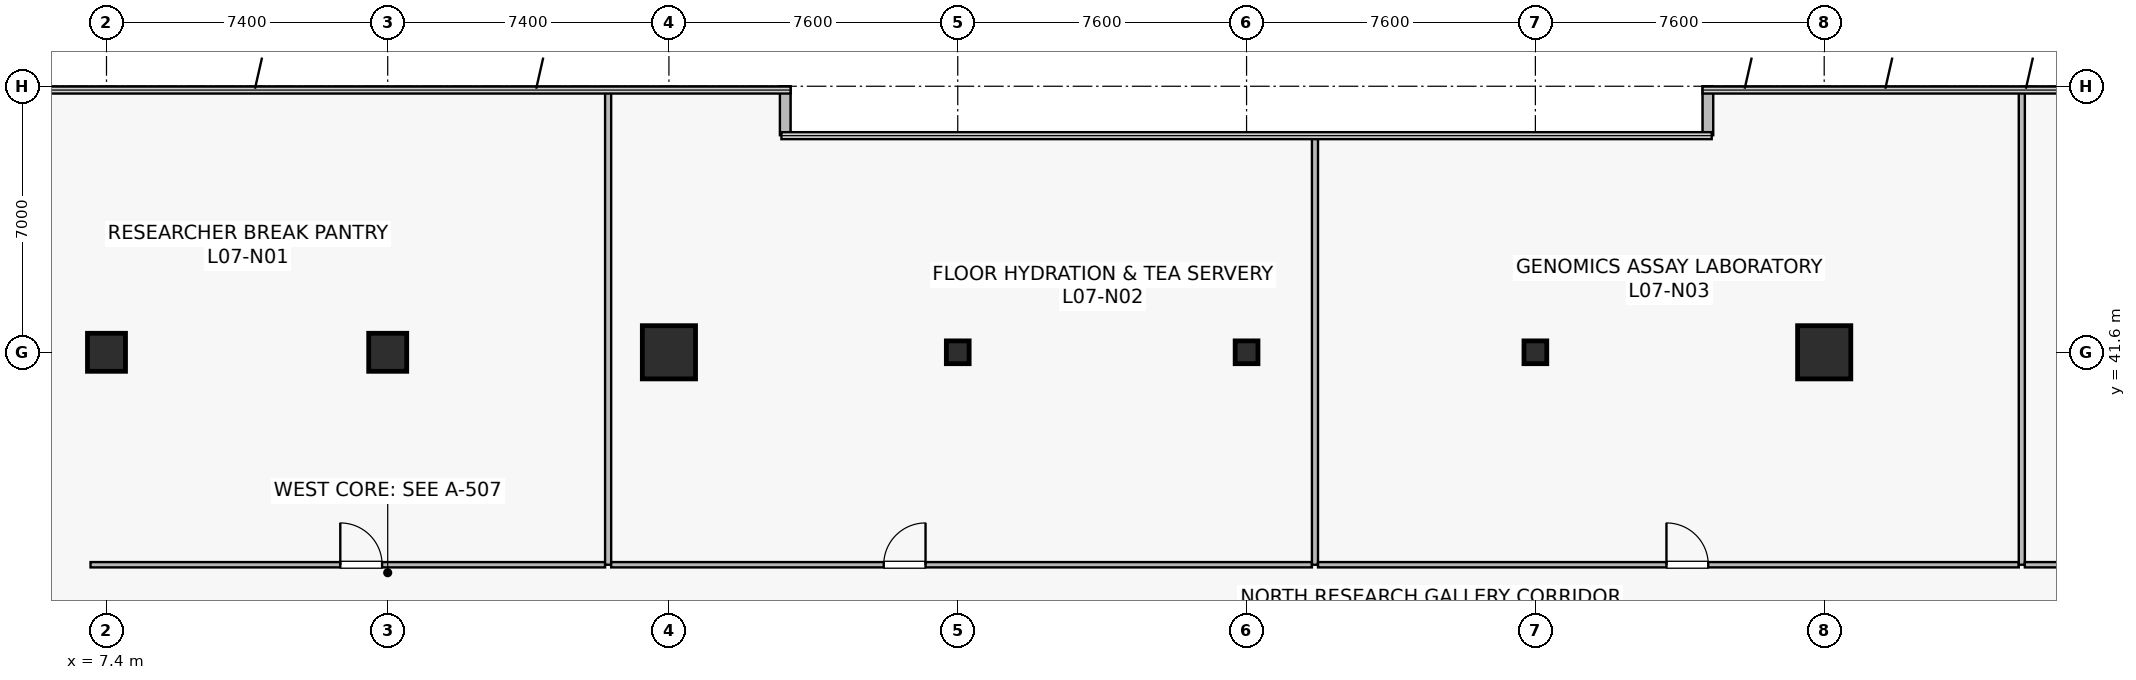
"""IFC4 building model, lengths in metres.
Left out: names, types, materials, properties, quantities, classifications, styles, units other than length and angle.
Written with IfcOpenShell. Run it as: python <this file> out.ifc"""

import sys

from ifc_helpers import new_model, si_unit, direction, frame, frame_2d, origin, origin_2d, place, context, subcontext, project, spatial, rectangle, hollow_rectangle, extrude, source, transform, mapped, element, fill, save


model = new_model("IFC4")
c1 = context("Model", 3, precision=1e-05, world=origin(), true_north=direction((0.0, 1.0)))
c2 = subcontext(c1, "Body", "Model", "MODEL_VIEW")
j1 = project(units=[si_unit("LENGTHUNIT", "METRE"), si_unit("PLANEANGLEUNIT", "RADIAN")], contexts=[c1])
p1 = place(None, origin())
s1 = spatial("IfcSite", under=j1, at=p1, CompositionType="ELEMENT")
p2 = place(p1, origin())
s2 = spatial("IfcBuilding", under=s1, at=p2, CompositionType="ELEMENT")
p3 = place(p2, frame((0.0, 0.0, 29.3)))
s3 = spatial("IfcBuildingStorey", under=s2, at=p3, CompositionType="ELEMENT", Elevation=29.3)
m1 = source(origin(), c2, "Body", "SweptSolid", [
    extrude(rectangle(XDim=1.0, YDim=1.0, at=origin_2d()), origin(), (0.0, 0.0, 1.0), 4.1),
])
p4 = place(p3, frame((14.8, 41.6, 0.0), z_axis=(0.0, 0.0, 1.0), x_axis=(1.0, 0.0, 0.0)))
e1 = element("IfcColumn", 1, at=p4, inside=s3, PredefinedType="COLUMN", context=c2, shape_type="MappedRepresentation", body=[
    mapped(m1, transform((0.0, 0.0, 0.0), scale=1.0)),
])
m2 = source(origin(), c2, "Body", "SweptSolid", [
    extrude(rectangle(XDim=1.4, YDim=1.4, at=origin_2d()), origin(), (0.0, 0.0, 1.0), 4.1),
])
for number, where, z_axis, x_axis in (
    (2, (22.2, 41.6, 0.0), (0.0, 0.0, 1.0), (1.0, 0.0, 0.0)),
    (3, (52.6, 41.6, 0.0), (0.0, 0.0, 1.0), (1.0, 0.0, 0.0)),
):
    element("IfcColumn", number, at=place(p3, frame(where, z_axis=z_axis, x_axis=x_axis)), inside=s3, PredefinedType="COLUMN", context=c2, shape_type="MappedRepresentation", body=[
        mapped(m2, transform((0.0, 0.0, 0.0), scale=1.0)),
    ])
p5 = place(p3, frame((7.4, 41.6, 0.0), z_axis=(0.0, 0.0, 1.0), x_axis=(1.0, 0.0, 0.0)))
e4 = element("IfcColumn", 4, at=p5, inside=s3, PredefinedType="COLUMN", context=c2, shape_type="MappedRepresentation", body=[
    mapped(m1, transform((0.0, 0.0, 0.0), scale=1.0)),
])
m3 = source(origin(), c2, "Body", "SweptSolid", [
    extrude(hollow_rectangle(XDim=0.6, YDim=0.6, WallThickness=0.028, at=origin_2d()), origin(), (0.0, 0.0, 1.0), 4.1),
])
for number, where, z_axis, x_axis in (
    (5, (29.8, 41.6, 0.0), (0.0, 0.0, 1.0), (1.0, 0.0, 0.0)),
    (6, (37.4, 41.6, 0.0), (0.0, 0.0, 1.0), (1.0, 0.0, 0.0)),
    (7, (45.0, 41.6, 0.0), (0.0, 0.0, 1.0), (1.0, 0.0, 0.0)),
):
    element("IfcColumn", number, at=place(p3, frame(where, z_axis=z_axis, x_axis=x_axis)), inside=s3, PredefinedType="COLUMN", context=c2, shape_type="MappedRepresentation", body=[
        mapped(m3, transform((0.0, 0.0, 0.0), scale=1.0)),
    ])
for number, where, z_axis, x_axis in (
    (8, (49.54, 48.6, 0.0), (0.0, 0.0, 1.0), (0.0, -1.0, 0.0)),
    (9, (25.26, 47.312, 0.0), (0.0, 0.0, 1.0), (0.0, 1.0, 0.0)),
):
    element("IfcWall", number, at=place(p3, frame(where, z_axis=z_axis, x_axis=x_axis)), inside=s3, PredefinedType="STANDARD", context=c2, shape_type="SweptSolid", body=[
        extrude(rectangle(XDim=1.288, YDim=0.28, at=frame_2d((0.644, 0.0))), origin(), (0.0, 0.0, 1.0), 3.78),
    ])
p6 = place(p3, frame((6.98, 36.01, 0.0), z_axis=(0.0, 0.0, 1.0), x_axis=(1.0, 0.0, 0.0)))
e10 = element("IfcWall", 10, at=p6, inside=s3, PredefinedType="PARTITIONING", context=c2, shape_type="SweptSolid", body=[
    extrude(rectangle(XDim=13.54, YDim=0.14, at=frame_2d((6.77, 0.0))), origin(), (0.0, 0.0, 1.0), 3.065),
])
p7 = place(p6, frame((6.572, 0.0, 0.0)))
e11 = element("IfcOpeningElement", 11, at=p7, cuts=e10, PredefinedType="OPENING", context=c2, shape_type="SweptSolid", body=[
    extrude(rectangle(XDim=1.1, YDim=2.18, at=frame_2d((0.55, 1.09))), frame((0.0, 0.08, 0.0), z_axis=(0.0, -1.0, 0.0), x_axis=(1.0, 0.0, 0.0)), (0.0, 0.0, 1.0), 0.16),
])
p8 = place(p3, frame((20.6, 36.01, 0.0), z_axis=(0.0, 0.0, 1.0), x_axis=(0.0, 1.0, 0.0)))
e12 = element("IfcWall", 12, at=p8, inside=s3, PredefinedType="PARTITIONING", context=c2, shape_type="SweptSolid", body=[
    extrude(rectangle(XDim=12.48, YDim=0.16, at=frame_2d((6.24, 0.0))), origin(), (0.0, 0.0, 1.0), 3.015),
])
p9 = place(p3, frame((20.68, 36.01, 0.0), z_axis=(0.0, 0.0, 1.0), x_axis=(1.0, 0.0, 0.0)))
e13 = element("IfcWall", 13, at=p9, inside=s3, PredefinedType="PARTITIONING", context=c2, shape_type="SweptSolid", body=[
    extrude(rectangle(XDim=18.44, YDim=0.14, at=frame_2d((9.22, 0.0))), origin(), (0.0, 0.0, 1.0), 3.065),
])
p10 = place(p9, frame((7.172, 0.0, 0.0)))
e14 = element("IfcOpeningElement", 14, at=p10, cuts=e13, PredefinedType="OPENING", context=c2, shape_type="SweptSolid", body=[
    extrude(rectangle(XDim=1.1, YDim=2.18, at=frame_2d((0.55, 1.09))), frame((0.0, 0.08, 0.0), z_axis=(0.0, -1.0, 0.0), x_axis=(1.0, 0.0, 0.0)), (0.0, 0.0, 1.0), 0.16),
])
p11 = place(p3, frame((39.2, 36.01, 0.0), z_axis=(0.0, 0.0, 1.0), x_axis=(0.0, 1.0, 0.0)))
e15 = element("IfcWall", 15, at=p11, inside=s3, PredefinedType="PARTITIONING", context=c2, shape_type="SweptSolid", body=[
    extrude(rectangle(XDim=11.28, YDim=0.16, at=frame_2d((5.64, 0.0))), origin(), (0.0, 0.0, 1.0), 3.015),
])
p12 = place(p3, frame((39.28, 36.01, 0.0), z_axis=(0.0, 0.0, 1.0), x_axis=(1.0, 0.0, 0.0)))
e16 = element("IfcWall", 16, at=p12, inside=s3, PredefinedType="PARTITIONING", context=c2, shape_type="SweptSolid", body=[
    extrude(rectangle(XDim=18.44, YDim=0.14, at=frame_2d((9.22, 0.0))), origin(), (0.0, 0.0, 1.0), 3.065),
])
p13 = place(p12, frame((9.169, 0.0, 0.0)))
e17 = element("IfcOpeningElement", 17, at=p13, cuts=e16, PredefinedType="OPENING", context=c2, shape_type="SweptSolid", body=[
    extrude(rectangle(XDim=1.1, YDim=2.18, at=frame_2d((0.55, 1.09))), frame((0.0, 0.08, 0.0), z_axis=(0.0, -1.0, 0.0), x_axis=(1.0, 0.0, 0.0)), (0.0, 0.0, 1.0), 0.16),
])
p14 = place(p3, frame((57.8, 36.01, 0.0), z_axis=(0.0, 0.0, 1.0), x_axis=(0.0, 1.0, 0.0)))
e18 = element("IfcWall", 18, at=p14, inside=s3, PredefinedType="PARTITIONING", context=c2, shape_type="SweptSolid", body=[
    extrude(rectangle(XDim=12.48, YDim=0.16, at=frame_2d((6.24, 0.0))), origin(), (0.0, 0.0, 1.0), 3.015),
])
p15 = place(p3, frame((57.88, 36.01, 0.0), z_axis=(0.0, 0.0, 1.0), x_axis=(1.0, 0.0, 0.0)))
e19 = element("IfcWall", 19, at=p15, inside=s3, PredefinedType="PARTITIONING", context=c2, shape_type="SweptSolid", body=[
    extrude(rectangle(XDim=9.94, YDim=0.14, at=frame_2d((4.97, 0.0))), origin(), (0.0, 0.0, 1.0), 3.065),
])
p16 = place(p15, frame((3.688, 0.0, 0.0)))
e20 = element("IfcOpeningElement", 20, at=p16, cuts=e19, PredefinedType="OPENING", context=c2, shape_type="SweptSolid", body=[
    extrude(rectangle(XDim=1.1, YDim=2.18, at=frame_2d((0.55, 1.09))), frame((0.0, 0.08, 0.0), z_axis=(0.0, -1.0, 0.0), x_axis=(1.0, 0.0, 0.0)), (0.0, 0.0, 1.0), 0.16),
])
m4 = source(origin(), c2, "Body", "SweptSolid", [
    extrude(rectangle(XDim=1.1, YDim=2.18, at=frame_2d((0.55, 1.09))), frame((0.0, 0.025, 0.0), z_axis=(0.0, -1.0, 0.0), x_axis=(1.0, 0.0, 0.0)), (0.0, 0.0, 1.0), 0.05),
])
p17 = place(p7, origin())
e21 = element("IfcDoor", 21, at=p17, inside=s3, OperationType="SINGLE_SWING_LEFT", PredefinedType="DOOR", context=c2, shape_type="MappedRepresentation", body=[
    mapped(m4, transform((0.0, 0.0, 0.0), scale=1.0)),
])
fill(e11, e21)
p18 = place(p10, origin())
e22 = element("IfcDoor", 22, at=p18, inside=s3, OperationType="SINGLE_SWING_RIGHT", PredefinedType="DOOR", context=c2, shape_type="MappedRepresentation", body=[
    mapped(m4, transform((0.0, 0.0, 0.0), scale=1.0)),
])
fill(e14, e22)
p19 = place(p13, origin())
e23 = element("IfcDoor", 23, at=p19, inside=s3, OperationType="SINGLE_SWING_LEFT", PredefinedType="DOOR", context=c2, shape_type="MappedRepresentation", body=[
    mapped(m4, transform((0.0, 0.0, 0.0), scale=1.0)),
])
fill(e17, e23)
save(model, sys.argv[1])
